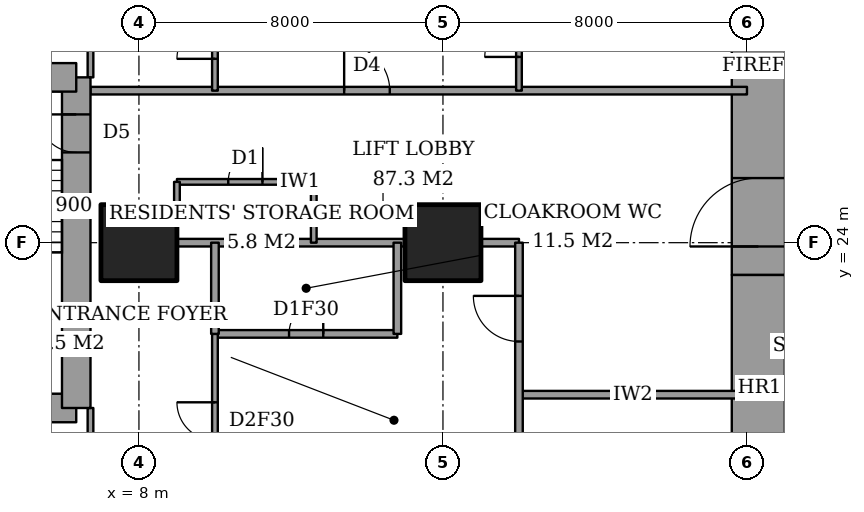
"""IFC4 building model, lengths in metres.
Left out: names, types, materials, properties, quantities, classifications, styles, units other than length and angle.
Written with IfcOpenShell. Run it as: python <this file> out.ifc"""

import sys

from ifc_helpers import new_model, si_unit, direction, frame, frame_2d, origin, origin_2d, place, context, subcontext, project, spatial, rectangle, extrude, element, fill, save


model = new_model("IFC4")
c1 = context("Model", 3, precision=1e-05, world=origin(), true_north=direction((0.0, 1.0)))
c2 = subcontext(c1, "Body", "Model", "MODEL_VIEW")
j1 = project(units=[si_unit("LENGTHUNIT", "METRE"), si_unit("PLANEANGLEUNIT", "RADIAN")], contexts=[c1])
p1 = place(None, origin())
s1 = spatial("IfcSite", under=j1, at=p1, CompositionType="ELEMENT")
p2 = place(p1, origin())
s2 = spatial("IfcBuilding", under=s1, at=p2, CompositionType="ELEMENT")
p3 = place(p2, frame((0.0, 0.0, 139.4)))
s3 = spatial("IfcBuildingStorey", under=s2, at=p3, CompositionType="ELEMENT", Elevation=139.4)
for number, where, z_axis, x_axis in (
    (1, (8.0, 24.0, 0.0), (0.0, 0.0, 1.0), (1.0, 0.0, 0.0)),
    (2, (16.0, 24.0, 0.0), (0.0, 0.0, 1.0), (1.0, 0.0, 0.0)),
):
    element("IfcColumn", number, at=place(p3, frame(where, z_axis=z_axis, x_axis=x_axis)), inside=s3, PredefinedType="COLUMN", context=c2, shape_type="SweptSolid", body=[
        extrude(rectangle(XDim=2.0, YDim=2.0, at=origin_2d()), origin(), (0.0, 0.0, 1.0), 3.6),
    ])
p4 = place(p3, frame((24.3, 13.0, 0.0), z_axis=(0.0, 0.0, 1.0), x_axis=(0.0, 1.0, 0.0)))
e3 = element("IfcWall", 3, at=p4, inside=s3, PredefinedType="SHEAR", context=c2, shape_type="SweptSolid", body=[
    extrude(rectangle(XDim=10.15, YDim=1.4, at=frame_2d((5.075, 0.0))), origin(), (0.0, 0.0, 1.0), 3.6),
])
p5 = place(p3, frame((24.3, 23.15, 0.0), z_axis=(0.0, 0.0, 1.0), x_axis=(0.0, 1.0, 0.0)))
e4 = element("IfcWall", 4, at=p5, inside=s3, PredefinedType="SHEAR", context=c2, shape_type="SweptSolid", body=[
    extrude(rectangle(XDim=11.85, YDim=1.4, at=frame_2d((5.925, 0.0))), origin(), (0.0, 0.0, 1.0), 3.6),
])
p6 = place(p5, frame((0.75, 0.0, 0.0)))
e5 = element("IfcOpeningElement", 5, at=p6, cuts=e4, PredefinedType="OPENING", context=c2, shape_type="SweptSolid", body=[
    extrude(rectangle(XDim=1.8, YDim=2.4, at=frame_2d((0.9, 1.2))), frame((0.0, 0.71, 0.0), z_axis=(0.0, -1.0, 0.0), x_axis=(1.0, 0.0, 0.0)), (0.0, 0.0, 1.0), 1.42),
])
p7 = place(p3, frame((1.9, 19.65, 0.0), z_axis=(0.0, 0.0, 1.0), x_axis=(1.0, 0.0, 0.0)))
e6 = element("IfcWall", 6, at=p7, inside=s3, PredefinedType="SHEAR", context=c2, shape_type="SweptSolid", body=[
    extrude(rectangle(XDim=4.45, YDim=0.75, at=frame_2d((2.225, 0.0))), origin(), (0.0, 0.0, 1.0), 3.6),
])
p8 = place(p3, frame((6.35, 19.65, 0.0), z_axis=(0.0, 0.0, 1.0), x_axis=(0.0, 1.0, 0.0)))
e7 = element("IfcWall", 7, at=p8, inside=s3, PredefinedType="SHEAR", context=c2, shape_type="SweptSolid", body=[
    extrude(rectangle(XDim=8.7, YDim=0.75, at=frame_2d((4.35, 0.0))), origin(), (0.0, 0.0, 1.0), 3.6),
])
p9 = place(p8, frame((6.725, 0.0, 0.0)))
e8 = element("IfcOpeningElement", 8, at=p9, cuts=e7, PredefinedType="OPENING", context=c2, shape_type="SweptSolid", body=[
    extrude(rectangle(XDim=1.0, YDim=2.1, at=frame_2d((0.5, 1.05))), frame((0.0, 0.385, 0.0), z_axis=(0.0, -1.0, 0.0), x_axis=(1.0, 0.0, 0.0)), (0.0, 0.0, 1.0), 0.77),
])
p10 = place(p3, frame((6.35, 28.35, 0.0), z_axis=(0.0, 0.0, 1.0), x_axis=(-1.0, 0.0, 0.0)))
e9 = element("IfcWall", 9, at=p10, inside=s3, PredefinedType="SHEAR", context=c2, shape_type="SweptSolid", body=[
    extrude(rectangle(XDim=4.45, YDim=0.75, at=frame_2d((2.225, 0.0))), origin(), (0.0, 0.0, 1.0), 3.6),
])
p11 = place(p3, frame((18.0, 20.0, 0.0), z_axis=(0.0, 0.0, 1.0), x_axis=(1.0, 0.0, 0.0)))
e10 = element("IfcWall", 10, at=p11, inside=s3, PredefinedType="PARTITIONING", context=c2, shape_type="SweptSolid", body=[
    extrude(rectangle(XDim=6.0, YDim=0.2, at=frame_2d((3.0, 0.0))), origin(), (0.0, 0.0, 1.0), 3.35),
])
p12 = place(p3, frame((10.0, 21.6, 0.0), z_axis=(0.0, 0.0, 1.0), x_axis=(1.0, 0.0, 0.0)))
e11 = element("IfcWall", 11, at=p12, inside=s3, PredefinedType="PARTITIONING", context=c2, shape_type="SweptSolid", body=[
    extrude(rectangle(XDim=4.8, YDim=0.2, at=frame_2d((2.4, 0.0))), origin(), (0.0, 0.0, 1.0), 3.35),
])
p13 = place(p12, frame((1.95, 0.0, 0.0)))
e12 = element("IfcOpeningElement", 12, at=p13, cuts=e11, PredefinedType="OPENING", context=c2, shape_type="SweptSolid", body=[
    extrude(rectangle(XDim=0.9, YDim=2.1, at=frame_2d((0.45, 1.05))), frame((0.0, 0.11, 0.0), z_axis=(0.0, -1.0, 0.0), x_axis=(1.0, 0.0, 0.0)), (0.0, 0.0, 1.0), 0.22),
])
p14 = place(p3, frame((9.0, 24.0, 0.0), z_axis=(0.0, 0.0, 1.0), x_axis=(1.0, 0.0, 0.0)))
e13 = element("IfcWall", 13, at=p14, inside=s3, PredefinedType="PARTITIONING", context=c2, shape_type="SweptSolid", body=[
    extrude(rectangle(XDim=6.0, YDim=0.2, at=frame_2d((3.0, 0.0))), origin(), (0.0, 0.0, 1.0), 3.35),
])
p15 = place(p3, frame((17.0, 24.0, 0.0), z_axis=(0.0, 0.0, 1.0), x_axis=(1.0, 0.0, 0.0)))
e14 = element("IfcWall", 14, at=p15, inside=s3, PredefinedType="PARTITIONING", context=c2, shape_type="SweptSolid", body=[
    extrude(rectangle(XDim=1.0, YDim=0.2, at=frame_2d((0.5, 0.0))), origin(), (0.0, 0.0, 1.0), 3.35),
])
p16 = place(p3, frame((9.0, 25.6, 0.0), z_axis=(0.0, 0.0, 1.0), x_axis=(1.0, 0.0, 0.0)))
e15 = element("IfcWall", 15, at=p16, inside=s3, PredefinedType="PARTITIONING", context=c2, shape_type="SweptSolid", body=[
    extrude(rectangle(XDim=3.6, YDim=0.15, at=frame_2d((1.8, 0.0))), origin(), (0.0, 0.0, 1.0), 3.35),
])
p17 = place(p16, frame((1.35, 0.0, 0.0)))
e16 = element("IfcOpeningElement", 16, at=p17, cuts=e15, PredefinedType="OPENING", context=c2, shape_type="SweptSolid", body=[
    extrude(rectangle(XDim=0.9, YDim=2.1, at=frame_2d((0.45, 1.05))), frame((0.0, 0.085, 0.0), z_axis=(0.0, -1.0, 0.0), x_axis=(1.0, 0.0, 0.0)), (0.0, 0.0, 1.0), 0.17),
])
p18 = place(p3, frame((6.725, 28.0, 0.0), z_axis=(0.0, 0.0, 1.0), x_axis=(1.0, 0.0, 0.0)))
e17 = element("IfcWall", 17, at=p18, inside=s3, PredefinedType="PARTITIONING", context=c2, shape_type="SweptSolid", body=[
    extrude(rectangle(XDim=17.275, YDim=0.2, at=frame_2d((8.637, 0.0))), origin(), (0.0, 0.0, 1.0), 3.35),
])
p19 = place(p18, frame((6.675, 0.0, 0.0)))
e18 = element("IfcOpeningElement", 18, at=p19, cuts=e17, PredefinedType="OPENING", context=c2, shape_type="SweptSolid", body=[
    extrude(rectangle(XDim=1.2, YDim=2.4, at=frame_2d((0.6, 1.2))), frame((0.0, 0.11, 0.0), z_axis=(0.0, -1.0, 0.0), x_axis=(1.0, 0.0, 0.0)), (0.0, 0.0, 1.0), 0.22),
])
p20 = place(p3, frame((6.725, 17.2, 0.0), z_axis=(0.0, 0.0, 1.0), x_axis=(0.0, 1.0, 0.0)))
e19 = element("IfcWall", 19, at=p20, inside=s3, PredefinedType="PARTITIONING", context=c2, shape_type="SweptSolid", body=[
    extrude(rectangle(XDim=2.45, YDim=0.15, at=frame_2d((1.225, 0.0))), origin(), (0.0, 0.0, 1.0), 3.35),
])
p21 = place(p20, frame((0.538, 0.0, 0.0)))
e20 = element("IfcOpeningElement", 20, at=p21, cuts=e19, PredefinedType="OPENING", context=c2, shape_type="SweptSolid", body=[
    extrude(rectangle(XDim=1.0, YDim=2.1, at=frame_2d((0.5, 1.05))), frame((0.0, 0.085, 0.0), z_axis=(0.0, -1.0, 0.0), x_axis=(1.0, 0.0, 0.0)), (0.0, 0.0, 1.0), 0.17),
])
p22 = place(p3, frame((6.725, 28.35, 0.0), z_axis=(0.0, 0.0, 1.0), x_axis=(0.0, 1.0, 0.0)))
e21 = element("IfcWall", 21, at=p22, inside=s3, PredefinedType="PARTITIONING", context=c2, shape_type="SweptSolid", body=[
    extrude(rectangle(XDim=2.45, YDim=0.15, at=frame_2d((1.225, 0.0))), origin(), (0.0, 0.0, 1.0), 3.35),
])
p23 = place(p22, frame((0.962, 0.0, 0.0)))
e22 = element("IfcOpeningElement", 22, at=p23, cuts=e21, PredefinedType="OPENING", context=c2, shape_type="SweptSolid", body=[
    extrude(rectangle(XDim=0.9, YDim=2.1, at=frame_2d((0.45, 1.05))), frame((0.0, 0.085, 0.0), z_axis=(0.0, -1.0, 0.0), x_axis=(1.0, 0.0, 0.0)), (0.0, 0.0, 1.0), 0.17),
])
p24 = place(p3, frame((9.0, 25.0, 0.0), z_axis=(0.0, 0.0, 1.0), x_axis=(0.0, 1.0, 0.0)))
e23 = element("IfcWall", 23, at=p24, inside=s3, PredefinedType="PARTITIONING", context=c2, shape_type="SweptSolid", body=[
    extrude(rectangle(XDim=0.6, YDim=0.15, at=frame_2d((0.3, 0.0))), origin(), (0.0, 0.0, 1.0), 3.35),
])
p25 = place(p3, frame((10.0, 21.6, 0.0), z_axis=(0.0, 0.0, 1.0), x_axis=(0.0, 1.0, 0.0)))
e24 = element("IfcWall", 24, at=p25, inside=s3, PredefinedType="PARTITIONING", context=c2, shape_type="SweptSolid", body=[
    extrude(rectangle(XDim=2.4, YDim=0.2, at=frame_2d((1.2, 0.0))), origin(), (0.0, 0.0, 1.0), 3.35),
])
p26 = place(p3, frame((10.0, 10.6, 0.0), z_axis=(0.0, 0.0, 1.0), x_axis=(0.0, 1.0, 0.0)))
e25 = element("IfcWall", 25, at=p26, inside=s3, PredefinedType="PARTITIONING", context=c2, shape_type="SweptSolid", body=[
    extrude(rectangle(XDim=11.0, YDim=0.15, at=frame_2d((5.5, 0.0))), origin(), (0.0, 0.0, 1.0), 3.35),
])
p27 = place(p26, frame((8.2, 0.0, 0.0)))
e26 = element("IfcOpeningElement", 26, at=p27, cuts=e25, PredefinedType="OPENING", context=c2, shape_type="SweptSolid", body=[
    extrude(rectangle(XDim=1.0, YDim=2.1, at=frame_2d((0.5, 1.05))), frame((0.0, 0.085, 0.0), z_axis=(0.0, -1.0, 0.0), x_axis=(1.0, 0.0, 0.0)), (0.0, 0.0, 1.0), 0.17),
])
p28 = place(p3, frame((10.0, 28.0, 0.0), z_axis=(0.0, 0.0, 1.0), x_axis=(0.0, 1.0, 0.0)))
e27 = element("IfcWall", 27, at=p28, inside=s3, PredefinedType="PARTITIONING", context=c2, shape_type="SweptSolid", body=[
    extrude(rectangle(XDim=3.0, YDim=0.15, at=frame_2d((1.5, 0.0))), origin(), (0.0, 0.0, 1.0), 3.35),
])
p29 = place(p28, frame((0.837, 0.0, 0.0)))
e28 = element("IfcOpeningElement", 28, at=p29, cuts=e27, PredefinedType="OPENING", context=c2, shape_type="SweptSolid", body=[
    extrude(rectangle(XDim=1.0, YDim=2.1, at=frame_2d((0.5, 1.05))), frame((0.0, 0.085, 0.0), z_axis=(0.0, -1.0, 0.0), x_axis=(1.0, 0.0, 0.0)), (0.0, 0.0, 1.0), 0.17),
])
p30 = place(p3, frame((12.6, 24.0, 0.0), z_axis=(0.0, 0.0, 1.0), x_axis=(0.0, 1.0, 0.0)))
e29 = element("IfcWall", 29, at=p30, inside=s3, PredefinedType="PARTITIONING", context=c2, shape_type="SweptSolid", body=[
    extrude(rectangle(XDim=1.6, YDim=0.15, at=frame_2d((0.8, 0.0))), origin(), (0.0, 0.0, 1.0), 3.35),
])
p31 = place(p3, frame((14.8, 21.6, 0.0), z_axis=(0.0, 0.0, 1.0), x_axis=(0.0, 1.0, 0.0)))
e30 = element("IfcWall", 30, at=p31, inside=s3, PredefinedType="PARTITIONING", context=c2, shape_type="SweptSolid", body=[
    extrude(rectangle(XDim=2.4, YDim=0.2, at=frame_2d((1.2, 0.0))), origin(), (0.0, 0.0, 1.0), 3.35),
])
p32 = place(p3, frame((18.0, 17.0, 0.0), z_axis=(0.0, 0.0, 1.0), x_axis=(0.0, 1.0, 0.0)))
e31 = element("IfcWall", 31, at=p32, inside=s3, PredefinedType="PARTITIONING", context=c2, shape_type="SweptSolid", body=[
    extrude(rectangle(XDim=7.0, YDim=0.2, at=frame_2d((3.5, 0.0))), origin(), (0.0, 0.0, 1.0), 3.35),
])
p33 = place(p32, frame((4.4, 0.0, 0.0)))
e32 = element("IfcOpeningElement", 32, at=p33, cuts=e31, PredefinedType="OPENING", context=c2, shape_type="SweptSolid", body=[
    extrude(rectangle(XDim=1.2, YDim=2.4, at=frame_2d((0.6, 1.2))), frame((0.0, 0.11, 0.0), z_axis=(0.0, -1.0, 0.0), x_axis=(1.0, 0.0, 0.0)), (0.0, 0.0, 1.0), 0.22),
])
p34 = place(p32, frame((1.05, 0.0, 0.0)))
e33 = element("IfcOpeningElement", 33, at=p34, cuts=e31, PredefinedType="OPENING", context=c2, shape_type="SweptSolid", body=[
    extrude(rectangle(XDim=0.9, YDim=2.1, at=frame_2d((0.45, 1.05))), frame((0.0, 0.11, 0.0), z_axis=(0.0, -1.0, 0.0), x_axis=(1.0, 0.0, 0.0)), (0.0, 0.0, 1.0), 0.22),
])
p35 = place(p3, frame((18.0, 28.0, 0.0), z_axis=(0.0, 0.0, 1.0), x_axis=(0.0, 1.0, 0.0)))
e34 = element("IfcWall", 34, at=p35, inside=s3, PredefinedType="PARTITIONING", context=c2, shape_type="SweptSolid", body=[
    extrude(rectangle(XDim=9.4, YDim=0.15, at=frame_2d((4.7, 0.0))), origin(), (0.0, 0.0, 1.0), 3.35),
])
p36 = place(p35, frame((0.887, 0.0, 0.0)))
e35 = element("IfcOpeningElement", 35, at=p36, cuts=e34, PredefinedType="OPENING", context=c2, shape_type="SweptSolid", body=[
    extrude(rectangle(XDim=0.9, YDim=2.1, at=frame_2d((0.45, 1.05))), frame((0.0, 0.085, 0.0), z_axis=(0.0, -1.0, 0.0), x_axis=(1.0, 0.0, 0.0)), (0.0, 0.0, 1.0), 0.17),
])
p37 = place(p27, origin())
e36 = element("IfcDoor", 36, at=p37, inside=s3, OperationType="SINGLE_SWING_LEFT", PredefinedType="DOOR", context=c2, shape_type="SweptSolid", body=[
    extrude(rectangle(XDim=1.0, YDim=2.1, at=frame_2d((0.5, 1.05))), frame((0.0, 0.025, 0.0), z_axis=(0.0, -1.0, 0.0), x_axis=(1.0, 0.0, 0.0)), (0.0, 0.0, 1.0), 0.05),
])
fill(e26, e36)
p38 = place(p13, origin())
e37 = element("IfcDoor", 37, at=p38, inside=s3, OperationType="SINGLE_SWING_LEFT", PredefinedType="DOOR", context=c2, shape_type="SweptSolid", body=[
    extrude(rectangle(XDim=0.9, YDim=2.1, at=frame_2d((0.45, 1.05))), frame((0.0, 0.025, 0.0), z_axis=(0.0, -1.0, 0.0), x_axis=(1.0, 0.0, 0.0)), (0.0, 0.0, 1.0), 0.05),
])
fill(e12, e37)
p39 = place(p33, origin())
e38 = element("IfcDoor", 38, at=p39, inside=s3, OperationType="SINGLE_SWING_LEFT", PredefinedType="DOOR", context=c2, shape_type="SweptSolid", body=[
    extrude(rectangle(XDim=1.2, YDim=2.4, at=frame_2d((0.6, 1.2))), frame((0.0, 0.025, 0.0), z_axis=(0.0, -1.0, 0.0), x_axis=(1.0, 0.0, 0.0)), (0.0, 0.0, 1.0), 0.05),
])
fill(e32, e38)
p40 = place(p29, origin())
e39 = element("IfcDoor", 39, at=p40, inside=s3, OperationType="SINGLE_SWING_RIGHT", PredefinedType="DOOR", context=c2, shape_type="SweptSolid", body=[
    extrude(rectangle(XDim=1.0, YDim=2.1, at=frame_2d((0.5, 1.05))), frame((0.0, 0.025, 0.0), z_axis=(0.0, -1.0, 0.0), x_axis=(1.0, 0.0, 0.0)), (0.0, 0.0, 1.0), 0.05),
])
fill(e28, e39)
p41 = place(p19, origin())
e40 = element("IfcDoor", 40, at=p41, inside=s3, OperationType="SINGLE_SWING_RIGHT", PredefinedType="DOOR", context=c2, shape_type="SweptSolid", body=[
    extrude(rectangle(XDim=1.2, YDim=2.4, at=frame_2d((0.6, 1.2))), frame((0.0, 0.025, 0.0), z_axis=(0.0, -1.0, 0.0), x_axis=(1.0, 0.0, 0.0)), (0.0, 0.0, 1.0), 0.05),
])
fill(e18, e40)
p42 = place(p36, origin())
e41 = element("IfcDoor", 41, at=p42, inside=s3, OperationType="SINGLE_SWING_RIGHT", PredefinedType="DOOR", context=c2, shape_type="SweptSolid", body=[
    extrude(rectangle(XDim=0.9, YDim=2.1, at=frame_2d((0.45, 1.05))), frame((0.0, 0.025, 0.0), z_axis=(0.0, -1.0, 0.0), x_axis=(1.0, 0.0, 0.0)), (0.0, 0.0, 1.0), 0.05),
])
fill(e35, e41)
p43 = place(p17, origin())
e42 = element("IfcDoor", 42, at=p43, inside=s3, OperationType="SINGLE_SWING_LEFT", PredefinedType="DOOR", context=c2, shape_type="SweptSolid", body=[
    extrude(rectangle(XDim=0.9, YDim=2.1, at=frame_2d((0.45, 1.05))), frame((0.0, 0.025, 0.0), z_axis=(0.0, -1.0, 0.0), x_axis=(1.0, 0.0, 0.0)), (0.0, 0.0, 1.0), 0.05),
])
fill(e16, e42)
p44 = place(p6, origin())
e43 = element("IfcDoor", 43, at=p44, inside=s3, OperationType="DOUBLE_DOOR_DOUBLE_SWING", PredefinedType="DOOR", context=c2, shape_type="SweptSolid", body=[
    extrude(rectangle(XDim=1.8, YDim=2.4, at=frame_2d((0.9, 1.2))), frame((0.0, 0.025, 0.0), z_axis=(0.0, -1.0, 0.0), x_axis=(1.0, 0.0, 0.0)), (0.0, 0.0, 1.0), 0.05),
])
fill(e5, e43)
p45 = place(p9, origin())
e44 = element("IfcDoor", 44, at=p45, inside=s3, OperationType="SINGLE_SWING_LEFT", PredefinedType="DOOR", context=c2, shape_type="SweptSolid", body=[
    extrude(rectangle(XDim=1.0, YDim=2.1, at=frame_2d((0.5, 1.05))), frame((0.0, 0.025, 0.0), z_axis=(0.0, -1.0, 0.0), x_axis=(1.0, 0.0, 0.0)), (0.0, 0.0, 1.0), 0.05),
])
fill(e8, e44)
save(model, sys.argv[1])
